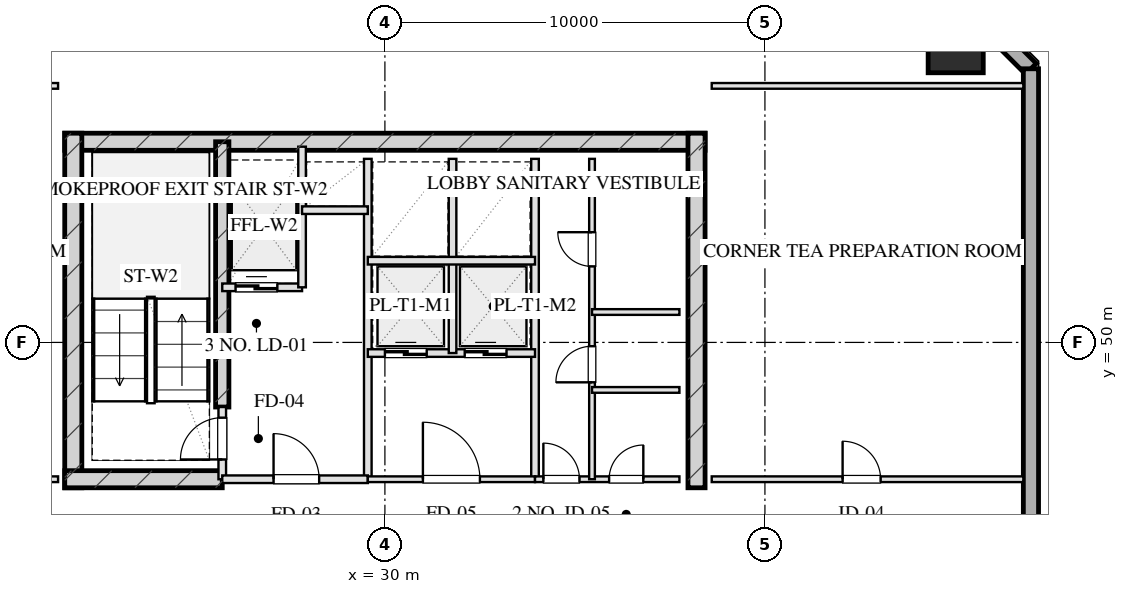
"""IFC4 building model, lengths in metres.
Left out: names, types, materials, properties, quantities, classifications, styles, units other than length and angle.
Written with IfcOpenShell. Run it as: python <this file> out.ifc"""

import sys

from ifc_helpers import new_model, si_unit, direction, frame, frame_2d, origin, origin_2d, place, context, subcontext, project, spatial, rectangle, hollow_rectangle, extrude, element, fill, save


model = new_model("IFC4")
c1 = context("Model", 3, precision=1e-05, world=origin(), true_north=direction((0.0, 1.0)))
c2 = subcontext(c1, "Body", "Model", "MODEL_VIEW")
j1 = project(units=[si_unit("LENGTHUNIT", "METRE"), si_unit("PLANEANGLEUNIT", "RADIAN")], contexts=[c1])
p1 = place(None, origin())
s1 = spatial("IfcSite", under=j1, at=p1, CompositionType="ELEMENT")
p2 = place(p1, origin())
s2 = spatial("IfcBuilding", under=s1, at=p2, CompositionType="ELEMENT")
p3 = place(p2, frame((0.0, 0.0, 209.3)))
s3 = spatial("IfcBuildingStorey", under=s2, at=p3, CompositionType="ELEMENT", Elevation=209.3)
p4 = place(p3, frame((21.575, 55.28, 0.0), z_axis=(0.0, 0.0, 1.0), x_axis=(1.0, 0.0, 0.0)))
e1 = element("IfcWall", 1, at=p4, inside=s3, PredefinedType="SHEAR", context=c2, shape_type="SweptSolid", body=[
    extrude(rectangle(XDim=16.85, YDim=0.45, at=frame_2d((8.425, 0.0))), origin(), (0.0, 0.0, 1.0), 3.45),
])
for number, where, z_axis, x_axis in (
    (2, (21.8, 46.175, 0.0), (0.0, 0.0, 1.0), (0.0, 1.0, 0.0)),
    (3, (38.2, 46.175, 0.0), (0.0, 0.0, 1.0), (0.0, 1.0, 0.0)),
):
    element("IfcWall", number, at=place(p3, frame(where, z_axis=z_axis, x_axis=x_axis)), inside=s3, PredefinedType="SHEAR", context=c2, shape_type="SweptSolid", body=[
        extrude(rectangle(XDim=9.33, YDim=0.45, at=frame_2d((4.665, 0.0))), origin(), (0.0, 0.0, 1.0), 3.45),
    ])
p5 = place(p3, frame((25.72, 48.3, 0.0), z_axis=(0.0, 0.0, 1.0), x_axis=(0.0, 1.0, 0.0)))
e4 = element("IfcWall", 4, at=p5, inside=s3, PredefinedType="SHEAR", context=c2, shape_type="SweptSolid", body=[
    extrude(rectangle(XDim=6.98, YDim=0.35, at=frame_2d((3.49, 0.0))), origin(), (0.0, 0.0, 1.0), 3.45),
])
p6 = place(p3, frame((21.575, 46.4, 0.0), z_axis=(0.0, 0.0, 1.0), x_axis=(1.0, 0.0, 0.0)))
e5 = element("IfcWall", 5, at=p6, inside=s3, PredefinedType="SHEAR", context=c2, shape_type="SweptSolid", body=[
    extrude(rectangle(XDim=4.145, YDim=0.45, at=frame_2d((2.073, 0.0))), origin(), (0.0, 0.0, 1.0), 3.45),
])
p7 = place(p3, frame((45.02, 57.82, 0.0), z_axis=(0.0, 0.0, 1.0), x_axis=(1.0, 0.0, 0.0)))
e6 = element("IfcColumn", 6, at=p7, inside=s3, PredefinedType="COLUMN", context=c2, shape_type="SweptSolid", body=[
    extrude(hollow_rectangle(XDim=1.45, YDim=1.45, WallThickness=0.05, at=origin_2d()), origin(), (0.0, 0.0, 1.0), 3.451),
])
p8 = place(p3, frame((44.4, 59.8, 0.0), z_axis=(0.0, 0.0, 1.0), x_axis=(0.707106781187, -0.707106781187, 0.0)))
e7 = element("IfcWall", 7, at=p8, inside=s3, PredefinedType="SOLIDWALL", context=c2, shape_type="SweptSolid", body=[
    extrude(rectangle(XDim=3.677, YDim=0.4, at=frame_2d((1.838, 0.0))), origin(), (0.0, 0.0, 1.0), 2.61),
])
p9 = place(p3, frame((47.0, 57.2, 0.0), z_axis=(0.0, 0.0, 1.0), x_axis=(0.0, -1.0, 0.0)))
e8 = element("IfcWall", 8, at=p9, inside=s3, PredefinedType="SOLIDWALL", context=c2, shape_type="SweptSolid", body=[
    extrude(rectangle(XDim=46.4, YDim=0.4, at=frame_2d((23.2, 0.0))), origin(), (0.0, 0.0, 1.0), 2.61),
])
p10 = place(p9, frame((19.55, 0.0, 0.75)))
e9 = element("IfcOpeningElement", 9, at=p10, cuts=e8, PredefinedType="OPENING", context=c2, shape_type="SweptSolid", body=[
    extrude(rectangle(XDim=2.1, YDim=1.46, at=frame_2d((1.05, 0.73))), frame((0.0, 0.21, 0.0), z_axis=(0.0, -1.0, 0.0), x_axis=(1.0, 0.0, 0.0)), (0.0, 0.0, 1.0), 0.42),
])
p11 = place(p9, frame((15.75, 0.0, 0.75)))
e10 = element("IfcOpeningElement", 10, at=p11, cuts=e8, PredefinedType="OPENING", context=c2, shape_type="SweptSolid", body=[
    extrude(rectangle(XDim=2.1, YDim=1.46, at=frame_2d((1.05, 0.73))), frame((0.0, 0.21, 0.0), z_axis=(0.0, -1.0, 0.0), x_axis=(1.0, 0.0, 0.0)), (0.0, 0.0, 1.0), 0.42),
])
p12 = place(p9, frame((28.45, 0.0, 0.0)))
e11 = element("IfcOpeningElement", 11, at=p12, cuts=e8, PredefinedType="OPENING", context=c2, shape_type="SweptSolid", body=[
    extrude(rectangle(XDim=1.1, YDim=2.15, at=frame_2d((0.55, 1.075))), frame((0.0, 0.21, 0.0), z_axis=(0.0, -1.0, 0.0), x_axis=(1.0, 0.0, 0.0)), (0.0, 0.0, 1.0), 0.42),
])
p13 = place(p3, frame((25.72, 46.4, 0.0), z_axis=(0.0, 0.0, 1.0), x_axis=(0.0, 1.0, 0.0)))
e12 = element("IfcWall", 12, at=p13, inside=s3, PredefinedType="PARTITIONING", context=c2, shape_type="SweptSolid", body=[
    extrude(rectangle(XDim=1.9, YDim=0.2, at=frame_2d((0.95, 0.0))), origin(), (0.0, 0.0, 1.0), 3.175),
])
p14 = place(p13, frame((0.52, 0.0, 0.0)))
e13 = element("IfcOpeningElement", 13, at=p14, cuts=e12, PredefinedType="OPENING", context=c2, shape_type="SweptSolid", body=[
    extrude(rectangle(XDim=1.1, YDim=2.05, at=frame_2d((0.55, 1.025))), frame((0.0, 0.11, 0.0), z_axis=(0.0, -1.0, 0.0), x_axis=(1.0, 0.0, 0.0)), (0.0, 0.0, 1.0), 0.22),
])
p15 = place(p3, frame((29.55, 46.4, 0.0), z_axis=(0.0, 0.0, 1.0), x_axis=(0.0, 1.0, 0.0)))
e14 = element("IfcWall", 14, at=p15, inside=s3, PredefinedType="PARTITIONING", context=c2, shape_type="SweptSolid", body=[
    extrude(rectangle(XDim=8.43, YDim=0.2, at=frame_2d((4.215, 0.0))), origin(), (0.0, 0.0, 1.0), 3.175),
])
p16 = place(p3, frame((25.72, 46.4, 0.0), z_axis=(0.0, 0.0, 1.0), x_axis=(1.0, 0.0, 0.0)))
e15 = element("IfcWall", 15, at=p16, inside=s3, PredefinedType="PARTITIONING", context=c2, shape_type="SweptSolid", body=[
    extrude(rectangle(XDim=3.83, YDim=0.2, at=frame_2d((1.915, 0.0))), origin(), (0.0, 0.0, 1.0), 3.175),
])
p17 = place(p16, frame((1.35, 0.0, 0.0)))
e16 = element("IfcOpeningElement", 16, at=p17, cuts=e15, PredefinedType="OPENING", context=c2, shape_type="SweptSolid", body=[
    extrude(rectangle(XDim=1.2, YDim=2.05, at=frame_2d((0.6, 1.025))), frame((0.0, 0.11, 0.0), z_axis=(0.0, -1.0, 0.0), x_axis=(1.0, 0.0, 0.0)), (0.0, 0.0, 1.0), 0.22),
])
p18 = place(p3, frame((25.72, 51.45, 0.0), z_axis=(0.0, 0.0, 1.0), x_axis=(1.0, 0.0, 0.0)))
e17 = element("IfcWall", 17, at=p18, inside=s3, PredefinedType="PARTITIONING", context=c2, shape_type="SweptSolid", body=[
    extrude(rectangle(XDim=2.1, YDim=0.2, at=frame_2d((1.05, 0.0))), origin(), (0.0, 0.0, 1.0), 3.175),
])
p19 = place(p18, frame((0.35, 0.0, 0.0)))
e18 = element("IfcOpeningElement", 18, at=p19, cuts=e17, PredefinedType="OPENING", context=c2, shape_type="SweptSolid", body=[
    extrude(rectangle(XDim=1.1, YDim=2.05, at=frame_2d((0.55, 1.025))), frame((0.0, 0.11, 0.0), z_axis=(0.0, -1.0, 0.0), x_axis=(1.0, 0.0, 0.0)), (0.0, 0.0, 1.0), 0.22),
])
p20 = place(p3, frame((27.82, 51.45, 0.0), z_axis=(0.0, 0.0, 1.0), x_axis=(0.0, 1.0, 0.0)))
e19 = element("IfcWall", 19, at=p20, inside=s3, PredefinedType="PARTITIONING", context=c2, shape_type="SweptSolid", body=[
    extrude(rectangle(XDim=3.7, YDim=0.2, at=frame_2d((1.85, 0.0))), origin(), (0.0, 0.0, 1.0), 3.175),
])
p21 = place(p3, frame((27.82, 53.48, 0.0), z_axis=(0.0, 0.0, 1.0), x_axis=(1.0, 0.0, 0.0)))
e20 = element("IfcWall", 20, at=p21, inside=s3, PredefinedType="PARTITIONING", context=c2, shape_type="SweptSolid", body=[
    extrude(rectangle(XDim=1.73, YDim=0.2, at=frame_2d((0.865, 0.0))), origin(), (0.0, 0.0, 1.0), 3.175),
])
p22 = place(p3, frame((33.95, 46.4, 0.0), z_axis=(0.0, 0.0, 1.0), x_axis=(0.0, 1.0, 0.0)))
e21 = element("IfcWall", 21, at=p22, inside=s3, PredefinedType="PARTITIONING", context=c2, shape_type="SweptSolid", body=[
    extrude(rectangle(XDim=8.43, YDim=0.2, at=frame_2d((4.215, 0.0))), origin(), (0.0, 0.0, 1.0), 3.175),
])
p23 = place(p3, frame((29.55, 46.4, 0.0), z_axis=(0.0, 0.0, 1.0), x_axis=(1.0, 0.0, 0.0)))
e22 = element("IfcWall", 22, at=p23, inside=s3, PredefinedType="PARTITIONING", context=c2, shape_type="SweptSolid", body=[
    extrude(rectangle(XDim=4.4, YDim=0.15, at=frame_2d((2.2, 0.0))), origin(), (0.0, 0.0, 1.0), 3.175),
])
p24 = place(p23, frame((1.45, 0.0, 0.0)))
e23 = element("IfcOpeningElement", 23, at=p24, cuts=e22, PredefinedType="OPENING", context=c2, shape_type="SweptSolid", body=[
    extrude(rectangle(XDim=1.5, YDim=2.05, at=frame_2d((0.75, 1.025))), frame((0.0, 0.085, 0.0), z_axis=(0.0, -1.0, 0.0), x_axis=(1.0, 0.0, 0.0)), (0.0, 0.0, 1.0), 0.17),
])
p25 = place(p3, frame((29.55, 49.72, 0.0), z_axis=(0.0, 0.0, 1.0), x_axis=(1.0, 0.0, 0.0)))
e24 = element("IfcWall", 24, at=p25, inside=s3, PredefinedType="PARTITIONING", context=c2, shape_type="SweptSolid", body=[
    extrude(rectangle(XDim=4.4, YDim=0.2, at=frame_2d((2.2, 0.0))), origin(), (0.0, 0.0, 1.0), 3.175),
])
p26 = place(p25, frame((0.45, 0.0, 0.0)))
e25 = element("IfcOpeningElement", 25, at=p26, cuts=e24, PredefinedType="OPENING", context=c2, shape_type="SweptSolid", body=[
    extrude(rectangle(XDim=1.1, YDim=2.05, at=frame_2d((0.55, 1.025))), frame((0.0, 0.11, 0.0), z_axis=(0.0, -1.0, 0.0), x_axis=(1.0, 0.0, 0.0)), (0.0, 0.0, 1.0), 0.22),
])
p27 = place(p25, frame((2.55, 0.0, 0.0)))
e26 = element("IfcOpeningElement", 26, at=p27, cuts=e24, PredefinedType="OPENING", context=c2, shape_type="SweptSolid", body=[
    extrude(rectangle(XDim=1.1, YDim=2.05, at=frame_2d((0.55, 1.025))), frame((0.0, 0.11, 0.0), z_axis=(0.0, -1.0, 0.0), x_axis=(1.0, 0.0, 0.0)), (0.0, 0.0, 1.0), 0.22),
])
p28 = place(p3, frame((31.78, 49.72, 0.0), z_axis=(0.0, 0.0, 1.0), x_axis=(0.0, 1.0, 0.0)))
e27 = element("IfcWall", 27, at=p28, inside=s3, PredefinedType="PARTITIONING", context=c2, shape_type="SweptSolid", body=[
    extrude(rectangle(XDim=5.11, YDim=0.2, at=frame_2d((2.555, 0.0))), origin(), (0.0, 0.0, 1.0), 3.175),
])
p29 = place(p3, frame((29.55, 52.15, 0.0), z_axis=(0.0, 0.0, 1.0), x_axis=(1.0, 0.0, 0.0)))
e28 = element("IfcWall", 28, at=p29, inside=s3, PredefinedType="PARTITIONING", context=c2, shape_type="SweptSolid", body=[
    extrude(rectangle(XDim=4.4, YDim=0.2, at=frame_2d((2.2, 0.0))), origin(), (0.0, 0.0, 1.0), 3.175),
])
p30 = place(p3, frame((33.95, 46.4, 0.0), z_axis=(0.0, 0.0, 1.0), x_axis=(1.0, 0.0, 0.0)))
e29 = element("IfcWall", 29, at=p30, inside=s3, PredefinedType="PARTITIONING", context=c2, shape_type="SweptSolid", body=[
    extrude(rectangle(XDim=3.8, YDim=0.15, at=frame_2d((1.9, 0.0))), origin(), (0.0, 0.0, 1.0), 3.175),
])
p31 = place(p30, frame((0.22, 0.0, 0.0)))
e30 = element("IfcOpeningElement", 30, at=p31, cuts=e29, PredefinedType="OPENING", context=c2, shape_type="SweptSolid", body=[
    extrude(rectangle(XDim=0.95, YDim=2.05, at=frame_2d((0.475, 1.025))), frame((0.0, 0.085, 0.0), z_axis=(0.0, -1.0, 0.0), x_axis=(1.0, 0.0, 0.0)), (0.0, 0.0, 1.0), 0.17),
])
p32 = place(p30, frame((1.95, 0.0, 0.0)))
e31 = element("IfcOpeningElement", 31, at=p32, cuts=e29, PredefinedType="OPENING", context=c2, shape_type="SweptSolid", body=[
    extrude(rectangle(XDim=0.9, YDim=2.05, at=frame_2d((0.45, 1.025))), frame((0.0, 0.085, 0.0), z_axis=(0.0, -1.0, 0.0), x_axis=(1.0, 0.0, 0.0)), (0.0, 0.0, 1.0), 0.17),
])
p33 = place(p3, frame((35.45, 46.4, 0.0), z_axis=(0.0, 0.0, 1.0), x_axis=(0.0, 1.0, 0.0)))
e32 = element("IfcWall", 32, at=p33, inside=s3, PredefinedType="PARTITIONING", context=c2, shape_type="SweptSolid", body=[
    extrude(rectangle(XDim=8.43, YDim=0.15, at=frame_2d((4.215, 0.0))), origin(), (0.0, 0.0, 1.0), 2.765),
])
p34 = place(p33, frame((2.55, 0.0, 0.0)))
e33 = element("IfcOpeningElement", 33, at=p34, cuts=e32, PredefinedType="OPENING", context=c2, shape_type="SweptSolid", body=[
    extrude(rectangle(XDim=0.95, YDim=2.05, at=frame_2d((0.475, 1.025))), frame((0.0, 0.085, 0.0), z_axis=(0.0, -1.0, 0.0), x_axis=(1.0, 0.0, 0.0)), (0.0, 0.0, 1.0), 0.17),
])
p35 = place(p33, frame((5.6, 0.0, 0.0)))
e34 = element("IfcOpeningElement", 34, at=p35, cuts=e32, PredefinedType="OPENING", context=c2, shape_type="SweptSolid", body=[
    extrude(rectangle(XDim=0.9, YDim=2.05, at=frame_2d((0.45, 1.025))), frame((0.0, 0.085, 0.0), z_axis=(0.0, -1.0, 0.0), x_axis=(1.0, 0.0, 0.0)), (0.0, 0.0, 1.0), 0.17),
])
for number, where, z_axis, x_axis in (
    (35, (35.45, 50.8, 0.0), (0.0, 0.0, 1.0), (1.0, 0.0, 0.0)),
    (36, (35.45, 48.75, 0.0), (0.0, 0.0, 1.0), (1.0, 0.0, 0.0)),
):
    element("IfcWall", number, at=place(p3, frame(where, z_axis=z_axis, x_axis=x_axis)), inside=s3, PredefinedType="PARTITIONING", context=c2, shape_type="SweptSolid", body=[
        extrude(rectangle(XDim=2.3, YDim=0.15, at=frame_2d((1.15, 0.0))), origin(), (0.0, 0.0, 1.0), 3.175),
    ])
p36 = place(p3, frame((13.2, 56.75, 0.0), z_axis=(0.0, 0.0, 1.0), x_axis=(1.0, 0.0, 0.0)))
e37 = element("IfcWall", 37, at=p36, inside=s3, PredefinedType="PARTITIONING", context=c2, shape_type="SweptSolid", body=[
    extrude(rectangle(XDim=8.2, YDim=0.15, at=frame_2d((4.1, 0.0))), origin(), (0.0, 0.0, 1.0), 3.175),
])
p37 = place(p3, frame((13.2, 46.4, 0.0), z_axis=(0.0, 0.0, 1.0), x_axis=(1.0, 0.0, 0.0)))
e38 = element("IfcWall", 38, at=p37, inside=s3, PredefinedType="PARTITIONING", context=c2, shape_type="SweptSolid", body=[
    extrude(rectangle(XDim=8.2, YDim=0.15, at=frame_2d((4.1, 0.0))), origin(), (0.0, 0.0, 1.0), 3.175),
])
p38 = place(p37, frame((3.444, 0.0, 0.0)))
e39 = element("IfcOpeningElement", 39, at=p38, cuts=e38, PredefinedType="OPENING", context=c2, shape_type="SweptSolid", body=[
    extrude(rectangle(XDim=1.0, YDim=2.05, at=frame_2d((0.5, 1.025))), frame((0.0, 0.085, 0.0), z_axis=(0.0, -1.0, 0.0), x_axis=(1.0, 0.0, 0.0)), (0.0, 0.0, 1.0), 0.17),
])
p39 = place(p3, frame((38.6, 56.75, 0.0), z_axis=(0.0, 0.0, 1.0), x_axis=(1.0, 0.0, 0.0)))
e40 = element("IfcWall", 40, at=p39, inside=s3, PredefinedType="PARTITIONING", context=c2, shape_type="SweptSolid", body=[
    extrude(rectangle(XDim=8.2, YDim=0.15, at=frame_2d((4.1, 0.0))), origin(), (0.0, 0.0, 1.0), 3.175),
])
p40 = place(p3, frame((38.6, 46.4, 0.0), z_axis=(0.0, 0.0, 1.0), x_axis=(1.0, 0.0, 0.0)))
e41 = element("IfcWall", 41, at=p40, inside=s3, PredefinedType="PARTITIONING", context=c2, shape_type="SweptSolid", body=[
    extrude(rectangle(XDim=8.2, YDim=0.15, at=frame_2d((4.1, 0.0))), origin(), (0.0, 0.0, 1.0), 3.175),
])
p41 = place(p40, frame((3.444, 0.0, 0.0)))
e42 = element("IfcOpeningElement", 42, at=p41, cuts=e41, PredefinedType="OPENING", context=c2, shape_type="SweptSolid", body=[
    extrude(rectangle(XDim=1.0, YDim=2.05, at=frame_2d((0.5, 1.025))), frame((0.0, 0.085, 0.0), z_axis=(0.0, -1.0, 0.0), x_axis=(1.0, 0.0, 0.0)), (0.0, 0.0, 1.0), 0.17),
])
p42 = place(p14, origin())
e43 = element("IfcDoor", 43, at=p42, inside=s3, OperationType="SINGLE_SWING_LEFT", PredefinedType="DOOR", context=c2, shape_type="SweptSolid", body=[
    extrude(rectangle(XDim=1.1, YDim=2.05, at=frame_2d((0.55, 1.025))), frame((0.0, 0.025, 0.0), z_axis=(0.0, -1.0, 0.0), x_axis=(1.0, 0.0, 0.0)), (0.0, 0.0, 1.0), 0.05),
])
fill(e13, e43)
p43 = place(p17, origin())
e44 = element("IfcDoor", 44, at=p43, inside=s3, OperationType="SINGLE_SWING_LEFT", PredefinedType="DOOR", context=c2, shape_type="SweptSolid", body=[
    extrude(rectangle(XDim=1.2, YDim=2.05, at=frame_2d((0.6, 1.025))), frame((0.0, 0.025, 0.0), z_axis=(0.0, -1.0, 0.0), x_axis=(1.0, 0.0, 0.0)), (0.0, 0.0, 1.0), 0.05),
])
fill(e16, e44)
p44 = place(p19, origin())
e45 = element("IfcDoor", 45, at=p44, inside=s3, OperationType="DOUBLE_DOOR_SLIDING", PredefinedType="DOOR", context=c2, shape_type="SweptSolid", body=[
    extrude(rectangle(XDim=1.1, YDim=2.05, at=frame_2d((0.55, 1.025))), frame((0.0, 0.025, 0.0), z_axis=(0.0, -1.0, 0.0), x_axis=(1.0, 0.0, 0.0)), (0.0, 0.0, 1.0), 0.05),
])
fill(e18, e45)
p45 = place(p24, origin())
e46 = element("IfcDoor", 46, at=p45, inside=s3, OperationType="SINGLE_SWING_LEFT", PredefinedType="DOOR", context=c2, shape_type="SweptSolid", body=[
    extrude(rectangle(XDim=1.5, YDim=2.05, at=frame_2d((0.75, 1.025))), frame((0.0, 0.025, 0.0), z_axis=(0.0, -1.0, 0.0), x_axis=(1.0, 0.0, 0.0)), (0.0, 0.0, 1.0), 0.05),
])
fill(e23, e46)
p46 = place(p26, origin())
e47 = element("IfcDoor", 47, at=p46, inside=s3, OperationType="DOUBLE_DOOR_SLIDING", PredefinedType="DOOR", context=c2, shape_type="SweptSolid", body=[
    extrude(rectangle(XDim=1.1, YDim=2.05, at=frame_2d((0.55, 1.025))), frame((0.0, 0.025, 0.0), z_axis=(0.0, -1.0, 0.0), x_axis=(1.0, 0.0, 0.0)), (0.0, 0.0, 1.0), 0.05),
])
fill(e25, e47)
p47 = place(p27, origin())
e48 = element("IfcDoor", 48, at=p47, inside=s3, OperationType="DOUBLE_DOOR_SLIDING", PredefinedType="DOOR", context=c2, shape_type="SweptSolid", body=[
    extrude(rectangle(XDim=1.1, YDim=2.05, at=frame_2d((0.55, 1.025))), frame((0.0, 0.025, 0.0), z_axis=(0.0, -1.0, 0.0), x_axis=(1.0, 0.0, 0.0)), (0.0, 0.0, 1.0), 0.05),
])
fill(e26, e48)
p48 = place(p31, origin())
e49 = element("IfcDoor", 49, at=p48, inside=s3, OperationType="SINGLE_SWING_LEFT", PredefinedType="DOOR", context=c2, shape_type="SweptSolid", body=[
    extrude(rectangle(XDim=0.95, YDim=2.05, at=frame_2d((0.475, 1.025))), frame((0.0, 0.025, 0.0), z_axis=(0.0, -1.0, 0.0), x_axis=(1.0, 0.0, 0.0)), (0.0, 0.0, 1.0), 0.05),
])
fill(e30, e49)
p49 = place(p32, origin())
e50 = element("IfcDoor", 50, at=p49, inside=s3, OperationType="SINGLE_SWING_RIGHT", PredefinedType="DOOR", context=c2, shape_type="SweptSolid", body=[
    extrude(rectangle(XDim=0.9, YDim=2.05, at=frame_2d((0.45, 1.025))), frame((0.0, 0.025, 0.0), z_axis=(0.0, -1.0, 0.0), x_axis=(1.0, 0.0, 0.0)), (0.0, 0.0, 1.0), 0.05),
])
fill(e31, e50)
p50 = place(p34, origin())
e51 = element("IfcDoor", 51, at=p50, inside=s3, OperationType="SINGLE_SWING_LEFT", PredefinedType="DOOR", context=c2, shape_type="SweptSolid", body=[
    extrude(rectangle(XDim=0.95, YDim=2.05, at=frame_2d((0.475, 1.025))), frame((0.0, 0.025, 0.0), z_axis=(0.0, -1.0, 0.0), x_axis=(1.0, 0.0, 0.0)), (0.0, 0.0, 1.0), 0.05),
])
fill(e33, e51)
p51 = place(p35, origin())
e52 = element("IfcDoor", 52, at=p51, inside=s3, OperationType="SINGLE_SWING_RIGHT", PredefinedType="DOOR", context=c2, shape_type="SweptSolid", body=[
    extrude(rectangle(XDim=0.9, YDim=2.05, at=frame_2d((0.45, 1.025))), frame((0.0, 0.025, 0.0), z_axis=(0.0, -1.0, 0.0), x_axis=(1.0, 0.0, 0.0)), (0.0, 0.0, 1.0), 0.05),
])
fill(e34, e52)
p52 = place(p41, origin())
e53 = element("IfcDoor", 53, at=p52, inside=s3, OperationType="SINGLE_SWING_LEFT", PredefinedType="DOOR", context=c2, shape_type="SweptSolid", body=[
    extrude(rectangle(XDim=1.0, YDim=2.05, at=frame_2d((0.5, 1.025))), frame((0.0, 0.025, 0.0), z_axis=(0.0, -1.0, 0.0), x_axis=(1.0, 0.0, 0.0)), (0.0, 0.0, 1.0), 0.05),
])
fill(e42, e53)
save(model, sys.argv[1])
